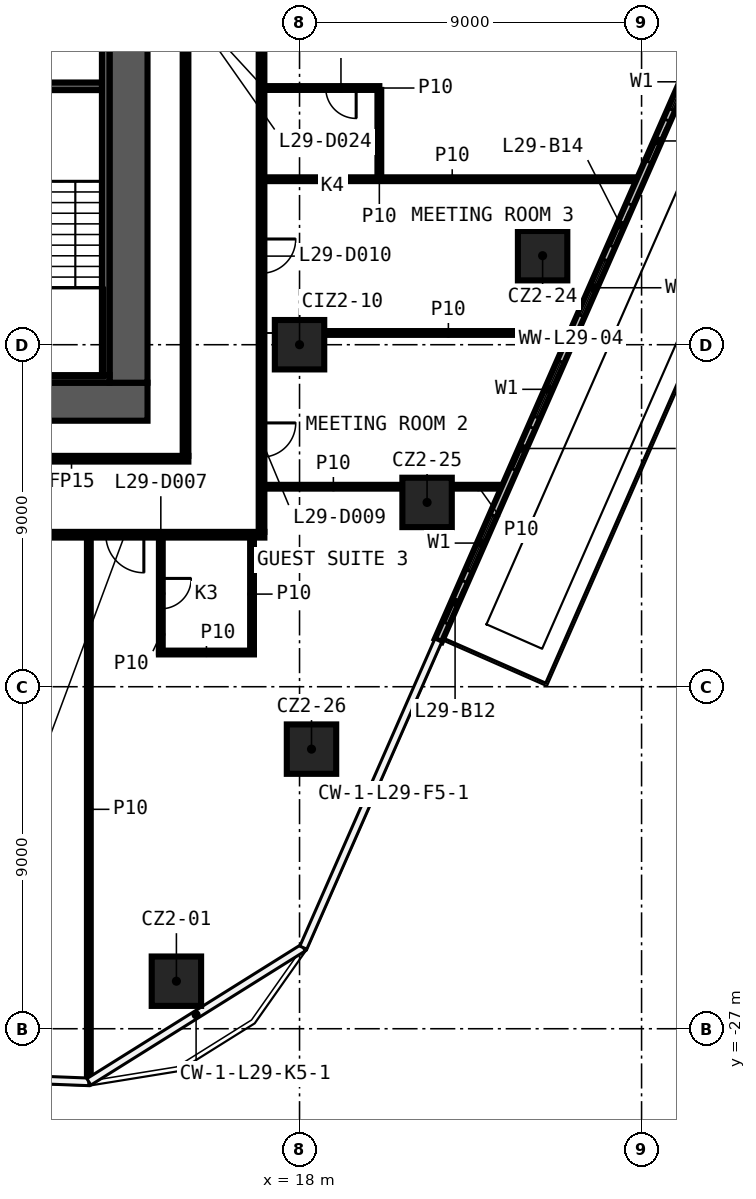
"""IFC4 building model, lengths in metres.
Left out: names, types, materials, properties, quantities, classifications, styles, units other than length and angle.
Written with IfcOpenShell. Run it as: python <this file> out.ifc"""

import sys

from ifc_helpers import new_model, si_unit, direction, frame, frame_2d, origin, origin_2d, place, context, subcontext, project, spatial, rectangle, extrude, element, fill, save


model = new_model("IFC4")
c1 = context("Model", 3, precision=1e-05, world=origin(), true_north=direction((0.0, 1.0)))
c2 = subcontext(c1, "Body", "Model", "MODEL_VIEW")
j1 = project(units=[si_unit("LENGTHUNIT", "METRE"), si_unit("PLANEANGLEUNIT", "RADIAN")], contexts=[c1])
p1 = place(None, origin())
s1 = spatial("IfcSite", under=j1, at=p1, CompositionType="ELEMENT")
p2 = place(p1, origin())
s2 = spatial("IfcBuilding", under=s1, at=p2, CompositionType="ELEMENT")
p3 = place(p2, frame((0.0, 0.0, 132.2)))
s3 = spatial("IfcBuildingStorey", under=s2, at=p3, CompositionType="ELEMENT", Elevation=132.2)
for number, where, z_axis, x_axis in (
    (1, (14.76, -25.749, 0.0), (0.0, 0.0, 1.0), (1.0, 0.0, 0.0)),
    (2, (24.396, -6.657, 0.0), (0.0, 0.0, 1.0), (1.0, 0.0, 0.0)),
    (3, (21.356, -13.15, 0.0), (0.0, 0.0, 1.0), (1.0, 0.0, 0.0)),
    (4, (18.315, -19.642, 0.0), (0.0, 0.0, 1.0), (1.0, 0.0, 0.0)),
    (5, (18.0, -9.0, 0.0), (0.0, 0.0, 1.0), (1.0, 0.0, 0.0)),
):
    element("IfcColumn", number, at=place(p3, frame(where, z_axis=z_axis, x_axis=x_axis)), inside=s3, PredefinedType="COLUMN", context=c2, shape_type="SweptSolid", body=[
        extrude(rectangle(XDim=1.3, YDim=1.3, at=origin_2d()), origin(), (0.0, 0.0, 1.0), 3.3),
    ])
p4 = place(p3, frame((14.3, -17.1, 0.0), z_axis=(0.0, 0.0, 1.0), x_axis=(1.0, 0.0, 0.0)))
e6 = element("IfcWall", 6, at=p4, inside=s3, PredefinedType="PARTITIONING", context=c2, shape_type="SweptSolid", body=[
    extrude(rectangle(XDim=2.5, YDim=0.1, at=frame_2d((1.25, 0.0))), origin(), (0.0, 0.0, 1.0), 3.3),
])
p5 = place(p3, frame((17.075, -14.0, 0.0), z_axis=(0.0, 0.0, 1.0), x_axis=(-1.0, 0.0, 0.0)))
e7 = element("IfcWall", 7, at=p5, inside=s3, PredefinedType="PARTITIONING", context=c2, shape_type="SweptSolid", body=[
    extrude(rectangle(XDim=34.15, YDim=0.15, at=frame_2d((17.075, 0.0))), origin(), (0.0, 0.0, 1.0), 3.3),
])
p6 = place(p5, frame((32.046, 0.0, 0.0)))
e8 = element("IfcOpeningElement", 8, at=p6, cuts=e7, PredefinedType="OPENING", context=c2, shape_type="SweptSolid", body=[
    extrude(rectangle(XDim=0.9, YDim=2.1, at=frame_2d((0.45, 1.05))), frame((0.0, 0.085, 0.0), z_axis=(0.0, -1.0, 0.0), x_axis=(1.0, 0.0, 0.0)), (0.0, 0.0, 1.0), 0.17),
])
p7 = place(p5, frame((24.32, 0.0, 0.0)))
e9 = element("IfcOpeningElement", 9, at=p7, cuts=e7, PredefinedType="OPENING", context=c2, shape_type="SweptSolid", body=[
    extrude(rectangle(XDim=1.0, YDim=2.1, at=frame_2d((0.5, 1.05))), frame((0.0, 0.085, 0.0), z_axis=(0.0, -1.0, 0.0), x_axis=(1.0, 0.0, 0.0)), (0.0, 0.0, 1.0), 0.17),
])
p8 = place(p5, frame((10.847, 0.0, 0.0)))
e10 = element("IfcOpeningElement", 10, at=p8, cuts=e7, PredefinedType="OPENING", context=c2, shape_type="SweptSolid", body=[
    extrude(rectangle(XDim=1.0, YDim=2.1, at=frame_2d((0.5, 1.05))), frame((0.0, 0.085, 0.0), z_axis=(0.0, -1.0, 0.0), x_axis=(1.0, 0.0, 0.0)), (0.0, 0.0, 1.0), 0.17),
])
p9 = place(p5, frame((3.172, 0.0, 0.0)))
e11 = element("IfcOpeningElement", 11, at=p9, cuts=e7, PredefinedType="OPENING", context=c2, shape_type="SweptSolid", body=[
    extrude(rectangle(XDim=1.0, YDim=2.1, at=frame_2d((0.5, 1.05))), frame((0.0, 0.085, 0.0), z_axis=(0.0, -1.0, 0.0), x_axis=(1.0, 0.0, 0.0)), (0.0, 0.0, 1.0), 0.17),
])
p10 = place(p3, frame((17.075, -12.737, 0.0), z_axis=(0.0, 0.0, 1.0), x_axis=(1.0, 0.0, 0.0)))
e12 = element("IfcWall", 12, at=p10, inside=s3, PredefinedType="PARTITIONING", context=c2, shape_type="SweptSolid", body=[
    extrude(rectangle(XDim=3.631, YDim=0.1, at=frame_2d((1.815, 0.0))), origin(), (0.0, 0.0, 1.0), 3.3),
])
p11 = place(p3, frame((22.006, -12.737, 0.0), z_axis=(0.0, 0.0, 1.0), x_axis=(1.0, 0.0, 0.0)))
e13 = element("IfcWall", 13, at=p11, inside=s3, PredefinedType="PARTITIONING", context=c2, shape_type="SweptSolid", body=[
    extrude(rectangle(XDim=1.4, YDim=0.1, at=frame_2d((0.7, 0.0))), origin(), (0.0, 0.0, 1.0), 3.3),
])
p12 = place(p3, frame((8.925, -12.0, 0.0), z_axis=(0.0, 0.0, 1.0), x_axis=(1.0, 0.0, 0.0)))
e14 = element("IfcWall", 14, at=p12, inside=s3, PredefinedType="PARTITIONING", context=c2, shape_type="SweptSolid", body=[
    extrude(rectangle(XDim=6.15, YDim=0.15, at=frame_2d((3.075, 0.0))), origin(), (0.0, 0.0, 1.0), 3.3),
])
p13 = place(p3, frame((18.65, -8.691, 0.0), z_axis=(0.0, 0.0, 1.0), x_axis=(1.0, 0.0, 0.0)))
e15 = element("IfcWall", 15, at=p13, inside=s3, PredefinedType="PARTITIONING", context=c2, shape_type="SweptSolid", body=[
    extrude(rectangle(XDim=6.533, YDim=0.1, at=frame_2d((3.267, 0.0))), origin(), (0.0, 0.0, 1.0), 3.3),
])
p14 = place(p3, frame((17.075, -4.645, 0.0), z_axis=(0.0, 0.0, 1.0), x_axis=(1.0, 0.0, 0.0)))
e16 = element("IfcWall", 16, at=p14, inside=s3, PredefinedType="PARTITIONING", context=c2, shape_type="SweptSolid", body=[
    extrude(rectangle(XDim=9.885, YDim=0.1, at=frame_2d((4.943, 0.0))), origin(), (0.0, 0.0, 1.0), 3.3),
])
p15 = place(p3, frame((20.1, -2.245, 0.0), z_axis=(0.0, 0.0, 1.0), x_axis=(-1.0, 0.0, 0.0)))
e17 = element("IfcWall", 17, at=p15, inside=s3, PredefinedType="PARTITIONING", context=c2, shape_type="SweptSolid", body=[
    extrude(rectangle(XDim=3.025, YDim=0.1, at=frame_2d((1.513, 0.0))), origin(), (0.0, 0.0, 1.0), 3.3),
])
p16 = place(p15, frame((0.61, 0.0, 0.0)))
e18 = element("IfcOpeningElement", 18, at=p16, cuts=e17, PredefinedType="OPENING", context=c2, shape_type="SweptSolid", body=[
    extrude(rectangle(XDim=0.8, YDim=2.1, at=frame_2d((0.4, 1.05))), frame((0.0, 0.06, 0.0), z_axis=(0.0, -1.0, 0.0), x_axis=(1.0, 0.0, 0.0)), (0.0, 0.0, 1.0), 0.12),
])
p17 = place(p3, frame((20.1, -4.595, 0.0), z_axis=(0.0, 0.0, 1.0), x_axis=(0.0, 1.0, 0.0)))
e19 = element("IfcWall", 19, at=p17, inside=s3, PredefinedType="PARTITIONING", context=c2, shape_type="SweptSolid", body=[
    extrude(rectangle(XDim=2.3, YDim=0.1, at=frame_2d((1.15, 0.0))), origin(), (0.0, 0.0, 1.0), 3.3),
])
p18 = place(p3, frame((17.0, 13.925, 0.0), z_axis=(0.0, 0.0, 1.0), x_axis=(0.0, -1.0, 0.0)))
e20 = element("IfcWall", 20, at=p18, inside=s3, PredefinedType="PARTITIONING", context=c2, shape_type="SweptSolid", body=[
    extrude(rectangle(XDim=27.85, YDim=0.15, at=frame_2d((13.925, 0.0))), origin(), (0.0, 0.0, 1.0), 3.3),
])
p19 = place(p18, frame((24.983, 0.0, 0.0)))
e21 = element("IfcOpeningElement", 21, at=p19, cuts=e20, PredefinedType="OPENING", context=c2, shape_type="SweptSolid", body=[
    extrude(rectangle(XDim=0.9, YDim=2.1, at=frame_2d((0.45, 1.05))), frame((0.0, 0.085, 0.0), z_axis=(0.0, -1.0, 0.0), x_axis=(1.0, 0.0, 0.0)), (0.0, 0.0, 1.0), 0.17),
])
p20 = place(p18, frame((20.143, 0.0, 0.0)))
e22 = element("IfcOpeningElement", 22, at=p20, cuts=e20, PredefinedType="OPENING", context=c2, shape_type="SweptSolid", body=[
    extrude(rectangle(XDim=0.9, YDim=2.1, at=frame_2d((0.45, 1.05))), frame((0.0, 0.085, 0.0), z_axis=(0.0, -1.0, 0.0), x_axis=(1.0, 0.0, 0.0)), (0.0, 0.0, 1.0), 0.17),
])
p21 = place(p18, frame((11.054, 0.0, 0.0)))
e23 = element("IfcOpeningElement", 23, at=p21, cuts=e20, PredefinedType="OPENING", context=c2, shape_type="SweptSolid", body=[
    extrude(rectangle(XDim=1.0, YDim=2.1, at=frame_2d((0.5, 1.05))), frame((0.0, 0.085, 0.0), z_axis=(0.0, -1.0, 0.0), x_axis=(1.0, 0.0, 0.0)), (0.0, 0.0, 1.0), 0.17),
])
p22 = place(p18, frame((7.139, 0.0, 0.0)))
e24 = element("IfcOpeningElement", 24, at=p22, cuts=e20, PredefinedType="OPENING", context=c2, shape_type="SweptSolid", body=[
    extrude(rectangle(XDim=0.9, YDim=2.1, at=frame_2d((0.45, 1.05))), frame((0.0, 0.085, 0.0), z_axis=(0.0, -1.0, 0.0), x_axis=(1.0, 0.0, 0.0)), (0.0, 0.0, 1.0), 0.17),
])
p23 = place(p3, frame((16.75, -17.05, 0.0), z_axis=(0.0, 0.0, 1.0), x_axis=(0.0, 1.0, 0.0)))
e25 = element("IfcWall", 25, at=p23, inside=s3, PredefinedType="PARTITIONING", context=c2, shape_type="SweptSolid", body=[
    extrude(rectangle(XDim=2.975, YDim=0.1, at=frame_2d((1.488, 0.0))), origin(), (0.0, 0.0, 1.0), 3.3),
])
p24 = place(p3, frame((15.0, -11.925, 0.0), z_axis=(0.0, 0.0, 1.0), x_axis=(0.0, 1.0, 0.0)))
e26 = element("IfcWall", 26, at=p24, inside=s3, PredefinedType="PARTITIONING", context=c2, shape_type="SweptSolid", body=[
    extrude(rectangle(XDim=23.85, YDim=0.15, at=frame_2d((11.925, 0.0))), origin(), (0.0, 0.0, 1.0), 3.3),
])
p25 = place(p24, frame((11.475, 0.0, 0.0)))
e27 = element("IfcOpeningElement", 27, at=p25, cuts=e26, PredefinedType="OPENING", context=c2, shape_type="SweptSolid", body=[
    extrude(rectangle(XDim=0.9, YDim=2.1, at=frame_2d((0.45, 1.05))), frame((0.0, 0.085, 0.0), z_axis=(0.0, -1.0, 0.0), x_axis=(1.0, 0.0, 0.0)), (0.0, 0.0, 1.0), 0.17),
])
p26 = place(p3, frame((14.35, -14.075, 0.0), z_axis=(0.0, 0.0, 1.0), x_axis=(0.0, -1.0, 0.0)))
e28 = element("IfcWall", 28, at=p26, inside=s3, PredefinedType="PARTITIONING", context=c2, shape_type="SweptSolid", body=[
    extrude(rectangle(XDim=3.025, YDim=0.1, at=frame_2d((1.513, 0.0))), origin(), (0.0, 0.0, 1.0), 3.3),
])
p27 = place(p26, frame((1.075, 0.0, 0.0)))
e29 = element("IfcOpeningElement", 29, at=p27, cuts=e28, PredefinedType="OPENING", context=c2, shape_type="SweptSolid", body=[
    extrude(rectangle(XDim=0.8, YDim=2.1, at=frame_2d((0.4, 1.05))), frame((0.0, 0.06, 0.0), z_axis=(0.0, -1.0, 0.0), x_axis=(1.0, 0.0, 0.0)), (0.0, 0.0, 1.0), 0.12),
])
p28 = place(p3, frame((12.456, -28.378, 0.0), z_axis=(0.0, 0.0, 1.0), x_axis=(0.0, 1.0, 0.0)))
e30 = element("IfcWall", 30, at=p28, inside=s3, PredefinedType="PARTITIONING", context=c2, shape_type="SweptSolid", body=[
    extrude(rectangle(XDim=14.303, YDim=0.1, at=frame_2d((7.151, 0.0))), origin(), (0.0, 0.0, 1.0), 3.3),
])
p29 = place(p3, frame((21.65, -16.783, 0.0), z_axis=(0.0, 0.0, 1.0), x_axis=(0.402171088909, 0.915564533633, 0.0)))
e31 = element("IfcWall", 31, at=p29, inside=s3, PredefinedType="SOLIDWALL", context=c2, shape_type="SweptSolid", body=[
    extrude(rectangle(XDim=17.677, YDim=0.2, at=frame_2d((8.838, 0.0))), origin(), (0.0, 0.0, 1.0), 3.3),
])
p30 = place(p29, frame((2.0, 0.0, 0.6)))
e32 = element("IfcOpeningElement", 32, at=p30, cuts=e31, PredefinedType="OPENING", context=c2, shape_type="SweptSolid", body=[
    extrude(rectangle(XDim=1.6, YDim=2.4, at=frame_2d((0.8, 1.2))), frame((0.0, 0.11, 0.0), z_axis=(0.0, -1.0, 0.0), x_axis=(1.0, 0.0, 0.0)), (0.0, 0.0, 1.0), 0.22),
])
p31 = place(p29, frame((0.5, 0.0, 0.0)))
e33 = element("IfcOpeningElement", 33, at=p31, cuts=e31, PredefinedType="OPENING", context=c2, shape_type="SweptSolid", body=[
    extrude(rectangle(XDim=1.2, YDim=2.4, at=frame_2d((0.6, 1.2))), frame((0.0, 0.11, 0.0), z_axis=(0.0, -1.0, 0.0), x_axis=(1.0, 0.0, 0.0)), (0.0, 0.0, 1.0), 0.22),
])
p32 = place(p29, frame((6.419, 0.0, 0.6)))
e34 = element("IfcOpeningElement", 34, at=p32, cuts=e31, PredefinedType="OPENING", context=c2, shape_type="SweptSolid", body=[
    extrude(rectangle(XDim=1.6, YDim=2.4, at=frame_2d((0.8, 1.2))), frame((0.0, 0.11, 0.0), z_axis=(0.0, -1.0, 0.0), x_axis=(1.0, 0.0, 0.0)), (0.0, 0.0, 1.0), 0.22),
])
p33 = place(p29, frame((4.919, 0.0, 0.0)))
e35 = element("IfcOpeningElement", 35, at=p33, cuts=e31, PredefinedType="OPENING", context=c2, shape_type="SweptSolid", body=[
    extrude(rectangle(XDim=1.2, YDim=2.4, at=frame_2d((0.6, 1.2))), frame((0.0, 0.11, 0.0), z_axis=(0.0, -1.0, 0.0), x_axis=(1.0, 0.0, 0.0)), (0.0, 0.0, 1.0), 0.22),
])
p34 = place(p29, frame((9.338, 0.0, 0.6)))
e36 = element("IfcOpeningElement", 36, at=p34, cuts=e31, PredefinedType="OPENING", context=c2, shape_type="SweptSolid", body=[
    extrude(rectangle(XDim=1.6, YDim=2.4, at=frame_2d((0.8, 1.2))), frame((0.0, 0.11, 0.0), z_axis=(0.0, -1.0, 0.0), x_axis=(1.0, 0.0, 0.0)), (0.0, 0.0, 1.0), 0.22),
])
p35 = place(p29, frame((11.338, 0.0, 0.0)))
e37 = element("IfcOpeningElement", 37, at=p35, cuts=e31, PredefinedType="OPENING", context=c2, shape_type="SweptSolid", body=[
    extrude(rectangle(XDim=1.2, YDim=2.4, at=frame_2d((0.6, 1.2))), frame((0.0, 0.11, 0.0), z_axis=(0.0, -1.0, 0.0), x_axis=(1.0, 0.0, 0.0)), (0.0, 0.0, 1.0), 0.22),
])
p36 = place(p29, frame((15.258, 0.0, 0.6)))
e38 = element("IfcOpeningElement", 38, at=p36, cuts=e31, PredefinedType="OPENING", context=c2, shape_type="SweptSolid", body=[
    extrude(rectangle(XDim=1.6, YDim=2.4, at=frame_2d((0.8, 1.2))), frame((0.0, 0.11, 0.0), z_axis=(0.0, -1.0, 0.0), x_axis=(1.0, 0.0, 0.0)), (0.0, 0.0, 1.0), 0.22),
])
p37 = place(p29, frame((13.758, 0.0, 0.0)))
e39 = element("IfcOpeningElement", 39, at=p37, cuts=e31, PredefinedType="OPENING", context=c2, shape_type="SweptSolid", body=[
    extrude(rectangle(XDim=1.2, YDim=2.4, at=frame_2d((0.6, 1.2))), frame((0.0, 0.11, 0.0), z_axis=(0.0, -1.0, 0.0), x_axis=(1.0, 0.0, 0.0)), (0.0, 0.0, 1.0), 0.22),
])
p38 = place(p3, frame((14.0, -10.5, 0.0), z_axis=(0.0, 0.0, 1.0), x_axis=(-1.0, 0.0, 0.0)))
e40 = element("IfcWall", 40, at=p38, inside=s3, PredefinedType="SHEAR", context=c2, shape_type="SweptSolid", body=[
    extrude(rectangle(XDim=28.0, YDim=1.0, at=frame_2d((14.0, 0.0))), origin(), (0.0, 0.0, 1.0), 3.3),
])
p39 = place(p38, frame((5.1, 0.0, 0.0)))
e41 = element("IfcOpeningElement", 41, at=p39, cuts=e40, PredefinedType="OPENING", context=c2, shape_type="SweptSolid", body=[
    extrude(rectangle(XDim=1.6, YDim=2.1, at=frame_2d((0.8, 1.05))), frame((0.0, 0.51, 0.0), z_axis=(0.0, -1.0, 0.0), x_axis=(1.0, 0.0, 0.0)), (0.0, 0.0, 1.0), 1.02),
])
p40 = place(p3, frame((13.5, 10.0, 0.0), z_axis=(0.0, 0.0, 1.0), x_axis=(0.0, -1.0, 0.0)))
e42 = element("IfcWall", 42, at=p40, inside=s3, PredefinedType="SHEAR", context=c2, shape_type="SweptSolid", body=[
    extrude(rectangle(XDim=20.0, YDim=1.0, at=frame_2d((10.0, 0.0))), origin(), (0.0, 0.0, 1.0), 3.3),
])
p41 = place(p3, frame((13.0, -9.9, 0.0), z_axis=(0.0, 0.0, 1.0), x_axis=(-1.0, 0.0, 0.0)))
e43 = element("IfcWall", 43, at=p41, inside=s3, PredefinedType="SHEAR", context=c2, shape_type="SweptSolid", body=[
    extrude(rectangle(XDim=3.7, YDim=0.2, at=frame_2d((1.85, 0.0))), origin(), (0.0, 0.0, 1.0), 3.3),
])
p42 = place(p3, frame((12.9, 9.8, 0.0), z_axis=(0.0, 0.0, 1.0), x_axis=(0.0, -1.0, 0.0)))
e44 = element("IfcWall", 44, at=p42, inside=s3, PredefinedType="SHEAR", context=c2, shape_type="SweptSolid", body=[
    extrude(rectangle(XDim=19.6, YDim=0.2, at=frame_2d((9.8, 0.0))), origin(), (0.0, 0.0, 1.0), 3.3),
])
p43 = place(p3, frame((9.45, -2.2, 0.0), z_axis=(0.0, 0.0, 1.0), x_axis=(1.0, 0.0, 0.0)))
e45 = element("IfcWall", 45, at=p43, inside=s3, PredefinedType="SHEAR", context=c2, shape_type="SweptSolid", body=[
    extrude(rectangle(XDim=3.35, YDim=0.2, at=frame_2d((1.675, 0.0))), origin(), (0.0, 0.0, 1.0), 3.3),
])
p44 = place(p27, origin())
e46 = element("IfcDoor", 46, at=p44, inside=s3, OperationType="SINGLE_SWING_RIGHT", PredefinedType="DOOR", context=c2, shape_type="SweptSolid", body=[
    extrude(rectangle(XDim=0.8, YDim=2.1, at=frame_2d((0.4, 1.05))), frame((0.0, 0.025, 0.0), z_axis=(0.0, -1.0, 0.0), x_axis=(1.0, 0.0, 0.0)), (0.0, 0.0, 1.0), 0.05),
])
fill(e29, e46)
p45 = place(p9, origin())
e47 = element("IfcDoor", 47, at=p45, inside=s3, OperationType="SINGLE_SWING_LEFT", PredefinedType="DOOR", context=c2, shape_type="SweptSolid", body=[
    extrude(rectangle(XDim=1.0, YDim=2.1, at=frame_2d((0.5, 1.05))), frame((0.0, 0.025, 0.0), z_axis=(0.0, -1.0, 0.0), x_axis=(1.0, 0.0, 0.0)), (0.0, 0.0, 1.0), 0.05),
])
fill(e11, e47)
p46 = place(p19, origin())
e48 = element("IfcDoor", 48, at=p46, inside=s3, OperationType="SINGLE_SWING_RIGHT", PredefinedType="DOOR", context=c2, shape_type="SweptSolid", body=[
    extrude(rectangle(XDim=0.9, YDim=2.1, at=frame_2d((0.45, 1.05))), frame((0.0, 0.025, 0.0), z_axis=(0.0, -1.0, 0.0), x_axis=(1.0, 0.0, 0.0)), (0.0, 0.0, 1.0), 0.05),
])
fill(e21, e48)
p47 = place(p20, origin())
e49 = element("IfcDoor", 49, at=p47, inside=s3, OperationType="SINGLE_SWING_LEFT", PredefinedType="DOOR", context=c2, shape_type="SweptSolid", body=[
    extrude(rectangle(XDim=0.9, YDim=2.1, at=frame_2d((0.45, 1.05))), frame((0.0, 0.025, 0.0), z_axis=(0.0, -1.0, 0.0), x_axis=(1.0, 0.0, 0.0)), (0.0, 0.0, 1.0), 0.05),
])
fill(e22, e49)
p48 = place(p16, origin())
e50 = element("IfcDoor", 50, at=p48, inside=s3, OperationType="SINGLE_SWING_LEFT", PredefinedType="DOOR", context=c2, shape_type="SweptSolid", body=[
    extrude(rectangle(XDim=0.8, YDim=2.1, at=frame_2d((0.4, 1.05))), frame((0.0, 0.025, 0.0), z_axis=(0.0, -1.0, 0.0), x_axis=(1.0, 0.0, 0.0)), (0.0, 0.0, 1.0), 0.05),
])
fill(e18, e50)
p49 = place(p30, origin())
e51 = element("IfcWindow", 51, at=p49, inside=s3, PartitioningType="SINGLE_PANEL", PredefinedType="WINDOW", context=c2, shape_type="SweptSolid", body=[
    extrude(rectangle(XDim=1.6, YDim=2.4, at=frame_2d((0.8, 1.2))), frame((0.0, 0.03, 0.0), z_axis=(0.0, -1.0, 0.0), x_axis=(1.0, 0.0, 0.0)), (0.0, 0.0, 1.0), 0.06),
])
fill(e32, e51)
p50 = place(p31, origin())
e52 = element("IfcDoor", 52, at=p50, inside=s3, OperationType="SLIDING_TO_LEFT", PredefinedType="DOOR", context=c2, shape_type="SweptSolid", body=[
    extrude(rectangle(XDim=1.2, YDim=2.4, at=frame_2d((0.6, 1.2))), frame((0.0, 0.025, 0.0), z_axis=(0.0, -1.0, 0.0), x_axis=(1.0, 0.0, 0.0)), (0.0, 0.0, 1.0), 0.05),
])
fill(e33, e52)
p51 = place(p32, origin())
e53 = element("IfcWindow", 53, at=p51, inside=s3, PartitioningType="SINGLE_PANEL", PredefinedType="WINDOW", context=c2, shape_type="SweptSolid", body=[
    extrude(rectangle(XDim=1.6, YDim=2.4, at=frame_2d((0.8, 1.2))), frame((0.0, 0.03, 0.0), z_axis=(0.0, -1.0, 0.0), x_axis=(1.0, 0.0, 0.0)), (0.0, 0.0, 1.0), 0.06),
])
fill(e34, e53)
p52 = place(p33, origin())
e54 = element("IfcDoor", 54, at=p52, inside=s3, OperationType="SLIDING_TO_LEFT", PredefinedType="DOOR", context=c2, shape_type="SweptSolid", body=[
    extrude(rectangle(XDim=1.2, YDim=2.4, at=frame_2d((0.6, 1.2))), frame((0.0, 0.025, 0.0), z_axis=(0.0, -1.0, 0.0), x_axis=(1.0, 0.0, 0.0)), (0.0, 0.0, 1.0), 0.05),
])
fill(e35, e54)
p53 = place(p34, origin())
e55 = element("IfcWindow", 55, at=p53, inside=s3, PartitioningType="SINGLE_PANEL", PredefinedType="WINDOW", context=c2, shape_type="SweptSolid", body=[
    extrude(rectangle(XDim=1.6, YDim=2.4, at=frame_2d((0.8, 1.2))), frame((0.0, 0.03, 0.0), z_axis=(0.0, -1.0, 0.0), x_axis=(1.0, 0.0, 0.0)), (0.0, 0.0, 1.0), 0.06),
])
fill(e36, e55)
p54 = place(p35, origin())
e56 = element("IfcDoor", 56, at=p54, inside=s3, OperationType="SLIDING_TO_LEFT", PredefinedType="DOOR", context=c2, shape_type="SweptSolid", body=[
    extrude(rectangle(XDim=1.2, YDim=2.4, at=frame_2d((0.6, 1.2))), frame((0.0, 0.025, 0.0), z_axis=(0.0, -1.0, 0.0), x_axis=(1.0, 0.0, 0.0)), (0.0, 0.0, 1.0), 0.05),
])
fill(e37, e56)
p55 = place(p36, origin())
e57 = element("IfcWindow", 57, at=p55, inside=s3, PartitioningType="SINGLE_PANEL", PredefinedType="WINDOW", context=c2, shape_type="SweptSolid", body=[
    extrude(rectangle(XDim=1.6, YDim=2.4, at=frame_2d((0.8, 1.2))), frame((0.0, 0.03, 0.0), z_axis=(0.0, -1.0, 0.0), x_axis=(1.0, 0.0, 0.0)), (0.0, 0.0, 1.0), 0.06),
])
fill(e38, e57)
p56 = place(p37, origin())
e58 = element("IfcDoor", 58, at=p56, inside=s3, OperationType="SLIDING_TO_LEFT", PredefinedType="DOOR", context=c2, shape_type="SweptSolid", body=[
    extrude(rectangle(XDim=1.2, YDim=2.4, at=frame_2d((0.6, 1.2))), frame((0.0, 0.025, 0.0), z_axis=(0.0, -1.0, 0.0), x_axis=(1.0, 0.0, 0.0)), (0.0, 0.0, 1.0), 0.05),
])
fill(e39, e58)
save(model, sys.argv[1])
